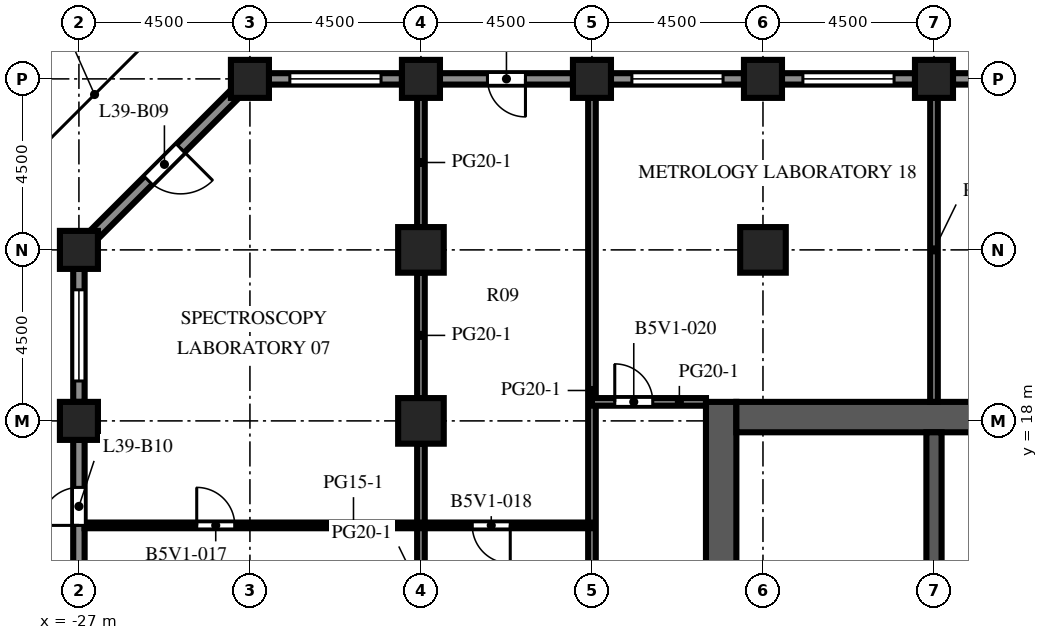
"""IFC4 building model, lengths in metres.
Left out: names, types, materials, properties, quantities, classifications, styles, units other than length and angle.
Written with IfcOpenShell. Run it as: python <this file> out.ifc"""

import sys

from ifc_helpers import new_model, si_unit, direction, frame, frame_2d, origin, origin_2d, place, context, subcontext, project, spatial, rectangle, extrude, element, fill, save


model = new_model("IFC4")
c1 = context("Model", 3, precision=1e-05, world=origin(), true_north=direction((0.0, 1.0)))
c2 = subcontext(c1, "Body", "Model", "MODEL_VIEW")
j1 = project(units=[si_unit("LENGTHUNIT", "METRE"), si_unit("PLANEANGLEUNIT", "RADIAN")], contexts=[c1])
p1 = place(None, origin())
s1 = spatial("IfcSite", under=j1, at=p1, CompositionType="ELEMENT")
p2 = place(p1, origin())
s2 = spatial("IfcBuilding", under=s1, at=p2, CompositionType="ELEMENT")
p3 = place(p2, frame((0.0, 0.0, 173.2)))
s3 = spatial("IfcBuildingStorey", under=s2, at=p3, CompositionType="ELEMENT", Elevation=173.2)
for number, where, z_axis, x_axis in (
    (1, (-27.0, 18.0, 0.0), (0.0, 0.0, 1.0), (1.0, 0.0, 0.0)),
    (2, (-27.0, 22.5, 0.0), (0.0, 0.0, 1.0), (1.0, 0.0, 0.0)),
    (3, (-22.5, 27.0, 0.0), (0.0, 0.0, 1.0), (1.0, 0.0, 0.0)),
    (4, (-18.0, 27.0, 0.0), (0.0, 0.0, 1.0), (1.0, 0.0, 0.0)),
    (5, (-13.5, 27.0, 0.0), (0.0, 0.0, 1.0), (1.0, 0.0, 0.0)),
    (6, (-9.0, 27.0, 0.0), (0.0, 0.0, 1.0), (1.0, 0.0, 0.0)),
    (7, (-4.5, 27.0, 0.0), (0.0, 0.0, 1.0), (1.0, 0.0, 0.0)),
):
    element("IfcColumn", number, at=place(p3, frame(where, z_axis=z_axis, x_axis=x_axis)), inside=s3, PredefinedType="COLUMN", context=c2, shape_type="SweptSolid", body=[
        extrude(rectangle(XDim=1.0, YDim=1.0, at=origin_2d()), origin(), (0.0, 0.0, 1.0), 4.1),
    ])
for number, where, z_axis, x_axis in (
    (8, (-18.0, 18.0, 0.0), (0.0, 0.0, 1.0), (1.0, 0.0, 0.0)),
    (9, (-18.0, 22.5, 0.0), (0.0, 0.0, 1.0), (1.0, 0.0, 0.0)),
    (10, (-9.0, 22.5, 0.0), (0.0, 0.0, 1.0), (1.0, 0.0, 0.0)),
):
    element("IfcColumn", number, at=place(p3, frame(where, z_axis=z_axis, x_axis=x_axis)), inside=s3, PredefinedType="COLUMN", context=c2, shape_type="SweptSolid", body=[
        extrude(rectangle(XDim=1.2, YDim=1.2, at=origin_2d()), origin(), (0.0, 0.0, 1.0), 4.1),
    ])
p4 = place(p3, frame((-10.1, -9.0, 0.0), z_axis=(0.0, 0.0, 1.0), x_axis=(0.0, 1.0, 0.0)))
e11 = element("IfcWall", 11, at=p4, inside=s3, PredefinedType="SHEAR", context=c2, shape_type="SweptSolid", body=[
    extrude(rectangle(XDim=27.5, YDim=0.8, at=frame_2d((13.75, 0.0))), origin(), (0.0, 0.0, 1.0), 4.1),
])
p5 = place(p4, frame((12.55, 0.0, 0.0)))
e12 = element("IfcOpeningElement", 12, at=p5, cuts=e11, PredefinedType="OPENING", context=c2, shape_type="SweptSolid", body=[
    extrude(rectangle(XDim=2.4, YDim=2.4, at=frame_2d((1.2, 1.2))), frame((0.0, 0.41, 0.0), z_axis=(0.0, -1.0, 0.0), x_axis=(1.0, 0.0, 0.0)), (0.0, 0.0, 1.0), 0.82),
])
p6 = place(p4, frame((6.825, 0.0, 0.0)))
e13 = element("IfcOpeningElement", 13, at=p6, cuts=e11, PredefinedType="OPENING", context=c2, shape_type="SweptSolid", body=[
    extrude(rectangle(XDim=1.2, YDim=2.1, at=frame_2d((0.6, 1.05))), frame((0.0, 0.41, 0.0), z_axis=(0.0, -1.0, 0.0), x_axis=(1.0, 0.0, 0.0)), (0.0, 0.0, 1.0), 0.82),
])
p7 = place(p4, frame((19.475, 0.0, 0.0)))
e14 = element("IfcOpeningElement", 14, at=p7, cuts=e11, PredefinedType="OPENING", context=c2, shape_type="SweptSolid", body=[
    extrude(rectangle(XDim=1.2, YDim=2.1, at=frame_2d((0.6, 1.05))), frame((0.0, 0.41, 0.0), z_axis=(0.0, -1.0, 0.0), x_axis=(1.0, 0.0, 0.0)), (0.0, 0.0, 1.0), 0.82),
])
p8 = place(p3, frame((-9.7, 18.1, 0.0), z_axis=(0.0, 0.0, 1.0), x_axis=(1.0, 0.0, 0.0)))
e15 = element("IfcWall", 15, at=p8, inside=s3, PredefinedType="SHEAR", context=c2, shape_type="SweptSolid", body=[
    extrude(rectangle(XDim=10.4, YDim=0.8, at=frame_2d((5.2, 0.0))), origin(), (0.0, 0.0, 1.0), 4.1),
])
p9 = place(p3, frame((-4.5, 10.2, 0.0), z_axis=(0.0, 0.0, 1.0), x_axis=(0.0, 1.0, 0.0)))
e16 = element("IfcWall", 16, at=p9, inside=s3, PredefinedType="SHEAR", context=c2, shape_type="SweptSolid", body=[
    extrude(rectangle(XDim=7.5, YDim=0.4, at=frame_2d((3.75, 0.0))), origin(), (0.0, 0.0, 1.0), 4.1),
])
p10 = place(p3, frame((-4.0, 27.0, 0.0), z_axis=(0.0, 0.0, 1.0), x_axis=(1.0, 0.0, 0.0)))
e17 = element("IfcWall", 17, at=p10, inside=s3, PredefinedType="SOLIDWALL", context=c2, shape_type="SweptSolid", body=[
    extrude(rectangle(XDim=3.5, YDim=0.3, at=frame_2d((1.75, 0.0))), origin(), (0.0, 0.0, 1.0), 2.85),
])
p11 = place(p10, frame((0.55, 0.0, 0.8)))
e18 = element("IfcOpeningElement", 18, at=p11, cuts=e17, PredefinedType="OPENING", context=c2, shape_type="SweptSolid", body=[
    extrude(rectangle(XDim=2.4, YDim=1.7, at=frame_2d((1.2, 0.85))), frame((0.0, 0.16, 0.0), z_axis=(0.0, -1.0, 0.0), x_axis=(1.0, 0.0, 0.0)), (0.0, 0.0, 1.0), 0.32),
])
p12 = place(p3, frame((-8.5, 27.0, 0.0), z_axis=(0.0, 0.0, 1.0), x_axis=(1.0, 0.0, 0.0)))
e19 = element("IfcWall", 19, at=p12, inside=s3, PredefinedType="SOLIDWALL", context=c2, shape_type="SweptSolid", body=[
    extrude(rectangle(XDim=3.5, YDim=0.3, at=frame_2d((1.75, 0.0))), origin(), (0.0, 0.0, 1.0), 2.85),
])
p13 = place(p12, frame((0.55, 0.0, 0.8)))
e20 = element("IfcOpeningElement", 20, at=p13, cuts=e19, PredefinedType="OPENING", context=c2, shape_type="SweptSolid", body=[
    extrude(rectangle(XDim=2.4, YDim=1.7, at=frame_2d((1.2, 0.85))), frame((0.0, 0.16, 0.0), z_axis=(0.0, -1.0, 0.0), x_axis=(1.0, 0.0, 0.0)), (0.0, 0.0, 1.0), 0.32),
])
p14 = place(p3, frame((-13.0, 27.0, 0.0), z_axis=(0.0, 0.0, 1.0), x_axis=(1.0, 0.0, 0.0)))
e21 = element("IfcWall", 21, at=p14, inside=s3, PredefinedType="SOLIDWALL", context=c2, shape_type="SweptSolid", body=[
    extrude(rectangle(XDim=3.5, YDim=0.3, at=frame_2d((1.75, 0.0))), origin(), (0.0, 0.0, 1.0), 2.85),
])
p15 = place(p14, frame((0.55, 0.0, 0.8)))
e22 = element("IfcOpeningElement", 22, at=p15, cuts=e21, PredefinedType="OPENING", context=c2, shape_type="SweptSolid", body=[
    extrude(rectangle(XDim=2.4, YDim=1.7, at=frame_2d((1.2, 0.85))), frame((0.0, 0.16, 0.0), z_axis=(0.0, -1.0, 0.0), x_axis=(1.0, 0.0, 0.0)), (0.0, 0.0, 1.0), 0.32),
])
p16 = place(p3, frame((-17.5, 27.0, 0.0), z_axis=(0.0, 0.0, 1.0), x_axis=(1.0, 0.0, 0.0)))
e23 = element("IfcWall", 23, at=p16, inside=s3, PredefinedType="SOLIDWALL", context=c2, shape_type="SweptSolid", body=[
    extrude(rectangle(XDim=3.5, YDim=0.3, at=frame_2d((1.75, 0.0))), origin(), (0.0, 0.0, 1.0), 2.85),
])
p17 = place(p16, frame((1.25, 0.0, 0.0)))
e24 = element("IfcOpeningElement", 24, at=p17, cuts=e23, PredefinedType="OPENING", context=c2, shape_type="SweptSolid", body=[
    extrude(rectangle(XDim=1.0, YDim=2.2, at=frame_2d((0.5, 1.1))), frame((0.0, 0.16, 0.0), z_axis=(0.0, -1.0, 0.0), x_axis=(1.0, 0.0, 0.0)), (0.0, 0.0, 1.0), 0.32),
])
p18 = place(p3, frame((-22.0, 27.0, 0.0), z_axis=(0.0, 0.0, 1.0), x_axis=(1.0, 0.0, 0.0)))
e25 = element("IfcWall", 25, at=p18, inside=s3, PredefinedType="SOLIDWALL", context=c2, shape_type="SweptSolid", body=[
    extrude(rectangle(XDim=3.5, YDim=0.3, at=frame_2d((1.75, 0.0))), origin(), (0.0, 0.0, 1.0), 2.85),
])
p19 = place(p18, frame((0.55, 0.0, 0.8)))
e26 = element("IfcOpeningElement", 26, at=p19, cuts=e25, PredefinedType="OPENING", context=c2, shape_type="SweptSolid", body=[
    extrude(rectangle(XDim=2.4, YDim=1.7, at=frame_2d((1.2, 0.85))), frame((0.0, 0.16, 0.0), z_axis=(0.0, -1.0, 0.0), x_axis=(1.0, 0.0, 0.0)), (0.0, 0.0, 1.0), 0.32),
])
p20 = place(p3, frame((-26.606, 22.894, 0.0), z_axis=(0.0, 0.0, 1.0), x_axis=(0.707106781187, 0.707106781187, 0.0)))
e27 = element("IfcWall", 27, at=p20, inside=s3, PredefinedType="SOLIDWALL", context=c2, shape_type="SweptSolid", body=[
    extrude(rectangle(XDim=5.25, YDim=0.3, at=frame_2d((2.625, 0.0))), origin(), (0.0, 0.0, 1.0), 2.85),
])
p21 = place(p20, frame((2.025, 0.0, 0.0)))
e28 = element("IfcOpeningElement", 28, at=p21, cuts=e27, PredefinedType="OPENING", context=c2, shape_type="SweptSolid", body=[
    extrude(rectangle(XDim=1.2, YDim=2.2, at=frame_2d((0.6, 1.1))), frame((0.0, 0.16, 0.0), z_axis=(0.0, -1.0, 0.0), x_axis=(1.0, 0.0, 0.0)), (0.0, 0.0, 1.0), 0.32),
])
p22 = place(p3, frame((-27.0, 18.5, 0.0), z_axis=(0.0, 0.0, 1.0), x_axis=(0.0, 1.0, 0.0)))
e29 = element("IfcWall", 29, at=p22, inside=s3, PredefinedType="SOLIDWALL", context=c2, shape_type="SweptSolid", body=[
    extrude(rectangle(XDim=3.5, YDim=0.3, at=frame_2d((1.75, 0.0))), origin(), (0.0, 0.0, 1.0), 2.85),
])
p23 = place(p22, frame((0.55, 0.0, 0.8)))
e30 = element("IfcOpeningElement", 30, at=p23, cuts=e29, PredefinedType="OPENING", context=c2, shape_type="SweptSolid", body=[
    extrude(rectangle(XDim=2.4, YDim=1.7, at=frame_2d((1.2, 0.85))), frame((0.0, 0.16, 0.0), z_axis=(0.0, -1.0, 0.0), x_axis=(1.0, 0.0, 0.0)), (0.0, 0.0, 1.0), 0.32),
])
p24 = place(p3, frame((-27.0, 14.0, 0.0), z_axis=(0.0, 0.0, 1.0), x_axis=(0.0, 1.0, 0.0)))
e31 = element("IfcWall", 31, at=p24, inside=s3, PredefinedType="SOLIDWALL", context=c2, shape_type="SweptSolid", body=[
    extrude(rectangle(XDim=3.5, YDim=0.3, at=frame_2d((1.75, 0.0))), origin(), (0.0, 0.0, 1.0), 2.85),
])
p25 = place(p24, frame((1.25, 0.0, 0.0)))
e32 = element("IfcOpeningElement", 32, at=p25, cuts=e31, PredefinedType="OPENING", context=c2, shape_type="SweptSolid", body=[
    extrude(rectangle(XDim=1.0, YDim=2.2, at=frame_2d((0.5, 1.1))), frame((0.0, 0.16, 0.0), z_axis=(0.0, -1.0, 0.0), x_axis=(1.0, 0.0, 0.0)), (0.0, 0.0, 1.0), 0.32),
])
p26 = place(p3, frame((-4.3, 14.85, 0.0), z_axis=(0.0, 0.0, 1.0), x_axis=(1.0, 0.0, 0.0)))
e33 = element("IfcWall", 33, at=p26, inside=s3, PredefinedType="PARTITIONING", context=c2, shape_type="SweptSolid", body=[
    extrude(rectangle(XDim=3.6, YDim=0.1, at=frame_2d((1.8, 0.0))), origin(), (0.0, 0.0, 1.0), 3.65),
])
p27 = place(p3, frame((-18.0, 9.6, 0.0), z_axis=(0.0, 0.0, 1.0), x_axis=(0.0, 1.0, 0.0)))
e34 = element("IfcWall", 34, at=p27, inside=s3, PredefinedType="PARTITIONING", context=c2, shape_type="SweptSolid", body=[
    extrude(rectangle(XDim=7.8, YDim=0.2, at=frame_2d((3.9, 0.0))), origin(), (0.0, 0.0, 1.0), 3.65),
])
p28 = place(p3, frame((-18.0, 18.6, 0.0), z_axis=(0.0, 0.0, 1.0), x_axis=(0.0, 1.0, 0.0)))
e35 = element("IfcWall", 35, at=p28, inside=s3, PredefinedType="PARTITIONING", context=c2, shape_type="SweptSolid", body=[
    extrude(rectangle(XDim=3.3, YDim=0.2, at=frame_2d((1.65, 0.0))), origin(), (0.0, 0.0, 1.0), 3.65),
])
p29 = place(p3, frame((-18.0, 23.1, 0.0), z_axis=(0.0, 0.0, 1.0), x_axis=(0.0, 1.0, 0.0)))
e36 = element("IfcWall", 36, at=p29, inside=s3, PredefinedType="PARTITIONING", context=c2, shape_type="SweptSolid", body=[
    extrude(rectangle(XDim=3.4, YDim=0.2, at=frame_2d((1.7, 0.0))), origin(), (0.0, 0.0, 1.0), 3.65),
])
p30 = place(p3, frame((-13.5, 6.25, 0.0), z_axis=(0.0, 0.0, 1.0), x_axis=(0.0, 1.0, 0.0)))
e37 = element("IfcWall", 37, at=p30, inside=s3, PredefinedType="PARTITIONING", context=c2, shape_type="SweptSolid", body=[
    extrude(rectangle(XDim=20.25, YDim=0.2, at=frame_2d((10.125, 0.0))), origin(), (0.0, 0.0, 1.0), 3.65),
])
p31 = place(p30, frame((3.85, 0.0, 0.0)))
e38 = element("IfcOpeningElement", 38, at=p31, cuts=e37, PredefinedType="OPENING", context=c2, shape_type="SweptSolid", body=[
    extrude(rectangle(XDim=1.0, YDim=2.1, at=frame_2d((0.5, 1.05))), frame((0.0, 0.11, 0.0), z_axis=(0.0, -1.0, 0.0), x_axis=(1.0, 0.0, 0.0)), (0.0, 0.0, 1.0), 0.22),
])
p32 = place(p3, frame((-4.5, 18.5, 0.0), z_axis=(0.0, 0.0, 1.0), x_axis=(0.0, 1.0, 0.0)))
e39 = element("IfcWall", 39, at=p32, inside=s3, PredefinedType="PARTITIONING", context=c2, shape_type="SweptSolid", body=[
    extrude(rectangle(XDim=8.0, YDim=0.2, at=frame_2d((4.0, 0.0))), origin(), (0.0, 0.0, 1.0), 3.65),
])
p33 = place(p3, frame((-26.85, 15.25, 0.0), z_axis=(0.0, 0.0, 1.0), x_axis=(1.0, 0.0, 0.0)))
e40 = element("IfcWall", 40, at=p33, inside=s3, PredefinedType="PARTITIONING", context=c2, shape_type="SweptSolid", body=[
    extrude(rectangle(XDim=13.35, YDim=0.15, at=frame_2d((6.675, 0.0))), origin(), (0.0, 0.0, 1.0), 3.65),
])
p34 = place(p33, frame((2.95, 0.0, 0.0)))
e41 = element("IfcOpeningElement", 41, at=p34, cuts=e40, PredefinedType="OPENING", context=c2, shape_type="SweptSolid", body=[
    extrude(rectangle(XDim=1.0, YDim=2.1, at=frame_2d((0.5, 1.05))), frame((0.0, 0.085, 0.0), z_axis=(0.0, -1.0, 0.0), x_axis=(1.0, 0.0, 0.0)), (0.0, 0.0, 1.0), 0.17),
])
p35 = place(p33, frame((10.2, 0.0, 0.0)))
e42 = element("IfcOpeningElement", 42, at=p35, cuts=e40, PredefinedType="OPENING", context=c2, shape_type="SweptSolid", body=[
    extrude(rectangle(XDim=1.0, YDim=2.1, at=frame_2d((0.5, 1.05))), frame((0.0, 0.085, 0.0), z_axis=(0.0, -1.0, 0.0), x_axis=(1.0, 0.0, 0.0)), (0.0, 0.0, 1.0), 0.17),
])
p36 = place(p3, frame((-13.5, 18.5, 0.0), z_axis=(0.0, 0.0, 1.0), x_axis=(1.0, 0.0, 0.0)))
e43 = element("IfcWall", 43, at=p36, inside=s3, PredefinedType="PARTITIONING", context=c2, shape_type="SweptSolid", body=[
    extrude(rectangle(XDim=3.0, YDim=0.2, at=frame_2d((1.5, 0.0))), origin(), (0.0, 0.0, 1.0), 3.65),
])
p37 = place(p36, frame((0.6, 0.0, 0.0)))
e44 = element("IfcOpeningElement", 44, at=p37, cuts=e43, PredefinedType="OPENING", context=c2, shape_type="SweptSolid", body=[
    extrude(rectangle(XDim=1.0, YDim=2.1, at=frame_2d((0.5, 1.05))), frame((0.0, 0.11, 0.0), z_axis=(0.0, -1.0, 0.0), x_axis=(1.0, 0.0, 0.0)), (0.0, 0.0, 1.0), 0.22),
])
p38 = place(p13, origin())
e45 = element("IfcWindow", 45, at=p38, inside=s3, PartitioningType="SINGLE_PANEL", PredefinedType="WINDOW", context=c2, shape_type="SweptSolid", body=[
    extrude(rectangle(XDim=2.4, YDim=1.7, at=frame_2d((1.2, 0.85))), frame((0.0, 0.03, 0.0), z_axis=(0.0, -1.0, 0.0), x_axis=(1.0, 0.0, 0.0)), (0.0, 0.0, 1.0), 0.06),
])
fill(e20, e45)
p39 = place(p15, origin())
e46 = element("IfcWindow", 46, at=p39, inside=s3, PartitioningType="SINGLE_PANEL", PredefinedType="WINDOW", context=c2, shape_type="SweptSolid", body=[
    extrude(rectangle(XDim=2.4, YDim=1.7, at=frame_2d((1.2, 0.85))), frame((0.0, 0.03, 0.0), z_axis=(0.0, -1.0, 0.0), x_axis=(1.0, 0.0, 0.0)), (0.0, 0.0, 1.0), 0.06),
])
fill(e22, e46)
p40 = place(p17, origin())
e47 = element("IfcDoor", 47, at=p40, inside=s3, OperationType="SINGLE_SWING_RIGHT", PredefinedType="DOOR", context=c2, shape_type="SweptSolid", body=[
    extrude(rectangle(XDim=1.0, YDim=2.2, at=frame_2d((0.5, 1.1))), frame((0.0, 0.025, 0.0), z_axis=(0.0, -1.0, 0.0), x_axis=(1.0, 0.0, 0.0)), (0.0, 0.0, 1.0), 0.05),
])
fill(e24, e47)
p41 = place(p19, origin())
e48 = element("IfcWindow", 48, at=p41, inside=s3, PartitioningType="SINGLE_PANEL", PredefinedType="WINDOW", context=c2, shape_type="SweptSolid", body=[
    extrude(rectangle(XDim=2.4, YDim=1.7, at=frame_2d((1.2, 0.85))), frame((0.0, 0.03, 0.0), z_axis=(0.0, -1.0, 0.0), x_axis=(1.0, 0.0, 0.0)), (0.0, 0.0, 1.0), 0.06),
])
fill(e26, e48)
p42 = place(p21, origin())
e49 = element("IfcDoor", 49, at=p42, inside=s3, OperationType="SINGLE_SWING_RIGHT", PredefinedType="DOOR", context=c2, shape_type="SweptSolid", body=[
    extrude(rectangle(XDim=1.2, YDim=2.2, at=frame_2d((0.6, 1.1))), frame((0.0, 0.025, 0.0), z_axis=(0.0, -1.0, 0.0), x_axis=(1.0, 0.0, 0.0)), (0.0, 0.0, 1.0), 0.05),
])
fill(e28, e49)
p43 = place(p23, origin())
e50 = element("IfcWindow", 50, at=p43, inside=s3, PartitioningType="SINGLE_PANEL", PredefinedType="WINDOW", context=c2, shape_type="SweptSolid", body=[
    extrude(rectangle(XDim=2.4, YDim=1.7, at=frame_2d((1.2, 0.85))), frame((0.0, 0.03, 0.0), z_axis=(0.0, -1.0, 0.0), x_axis=(1.0, 0.0, 0.0)), (0.0, 0.0, 1.0), 0.06),
])
fill(e30, e50)
p44 = place(p25, origin())
e51 = element("IfcDoor", 51, at=p44, inside=s3, OperationType="SINGLE_SWING_LEFT", PredefinedType="DOOR", context=c2, shape_type="SweptSolid", body=[
    extrude(rectangle(XDim=1.0, YDim=2.2, at=frame_2d((0.5, 1.1))), frame((0.0, 0.025, 0.0), z_axis=(0.0, -1.0, 0.0), x_axis=(1.0, 0.0, 0.0)), (0.0, 0.0, 1.0), 0.05),
])
fill(e32, e51)
p45 = place(p34, origin())
e52 = element("IfcDoor", 52, at=p45, inside=s3, OperationType="SINGLE_SWING_LEFT", PredefinedType="DOOR", context=c2, shape_type="SweptSolid", body=[
    extrude(rectangle(XDim=1.0, YDim=2.1, at=frame_2d((0.5, 1.05))), frame((0.0, 0.025, 0.0), z_axis=(0.0, -1.0, 0.0), x_axis=(1.0, 0.0, 0.0)), (0.0, 0.0, 1.0), 0.05),
])
fill(e41, e52)
p46 = place(p35, origin())
e53 = element("IfcDoor", 53, at=p46, inside=s3, OperationType="SINGLE_SWING_RIGHT", PredefinedType="DOOR", context=c2, shape_type="SweptSolid", body=[
    extrude(rectangle(XDim=1.0, YDim=2.1, at=frame_2d((0.5, 1.05))), frame((0.0, 0.025, 0.0), z_axis=(0.0, -1.0, 0.0), x_axis=(1.0, 0.0, 0.0)), (0.0, 0.0, 1.0), 0.05),
])
fill(e42, e53)
p47 = place(p37, origin())
e54 = element("IfcDoor", 54, at=p47, inside=s3, OperationType="SINGLE_SWING_LEFT", PredefinedType="DOOR", context=c2, shape_type="SweptSolid", body=[
    extrude(rectangle(XDim=1.0, YDim=2.1, at=frame_2d((0.5, 1.05))), frame((0.0, 0.025, 0.0), z_axis=(0.0, -1.0, 0.0), x_axis=(1.0, 0.0, 0.0)), (0.0, 0.0, 1.0), 0.05),
])
fill(e44, e54)
save(model, sys.argv[1])
